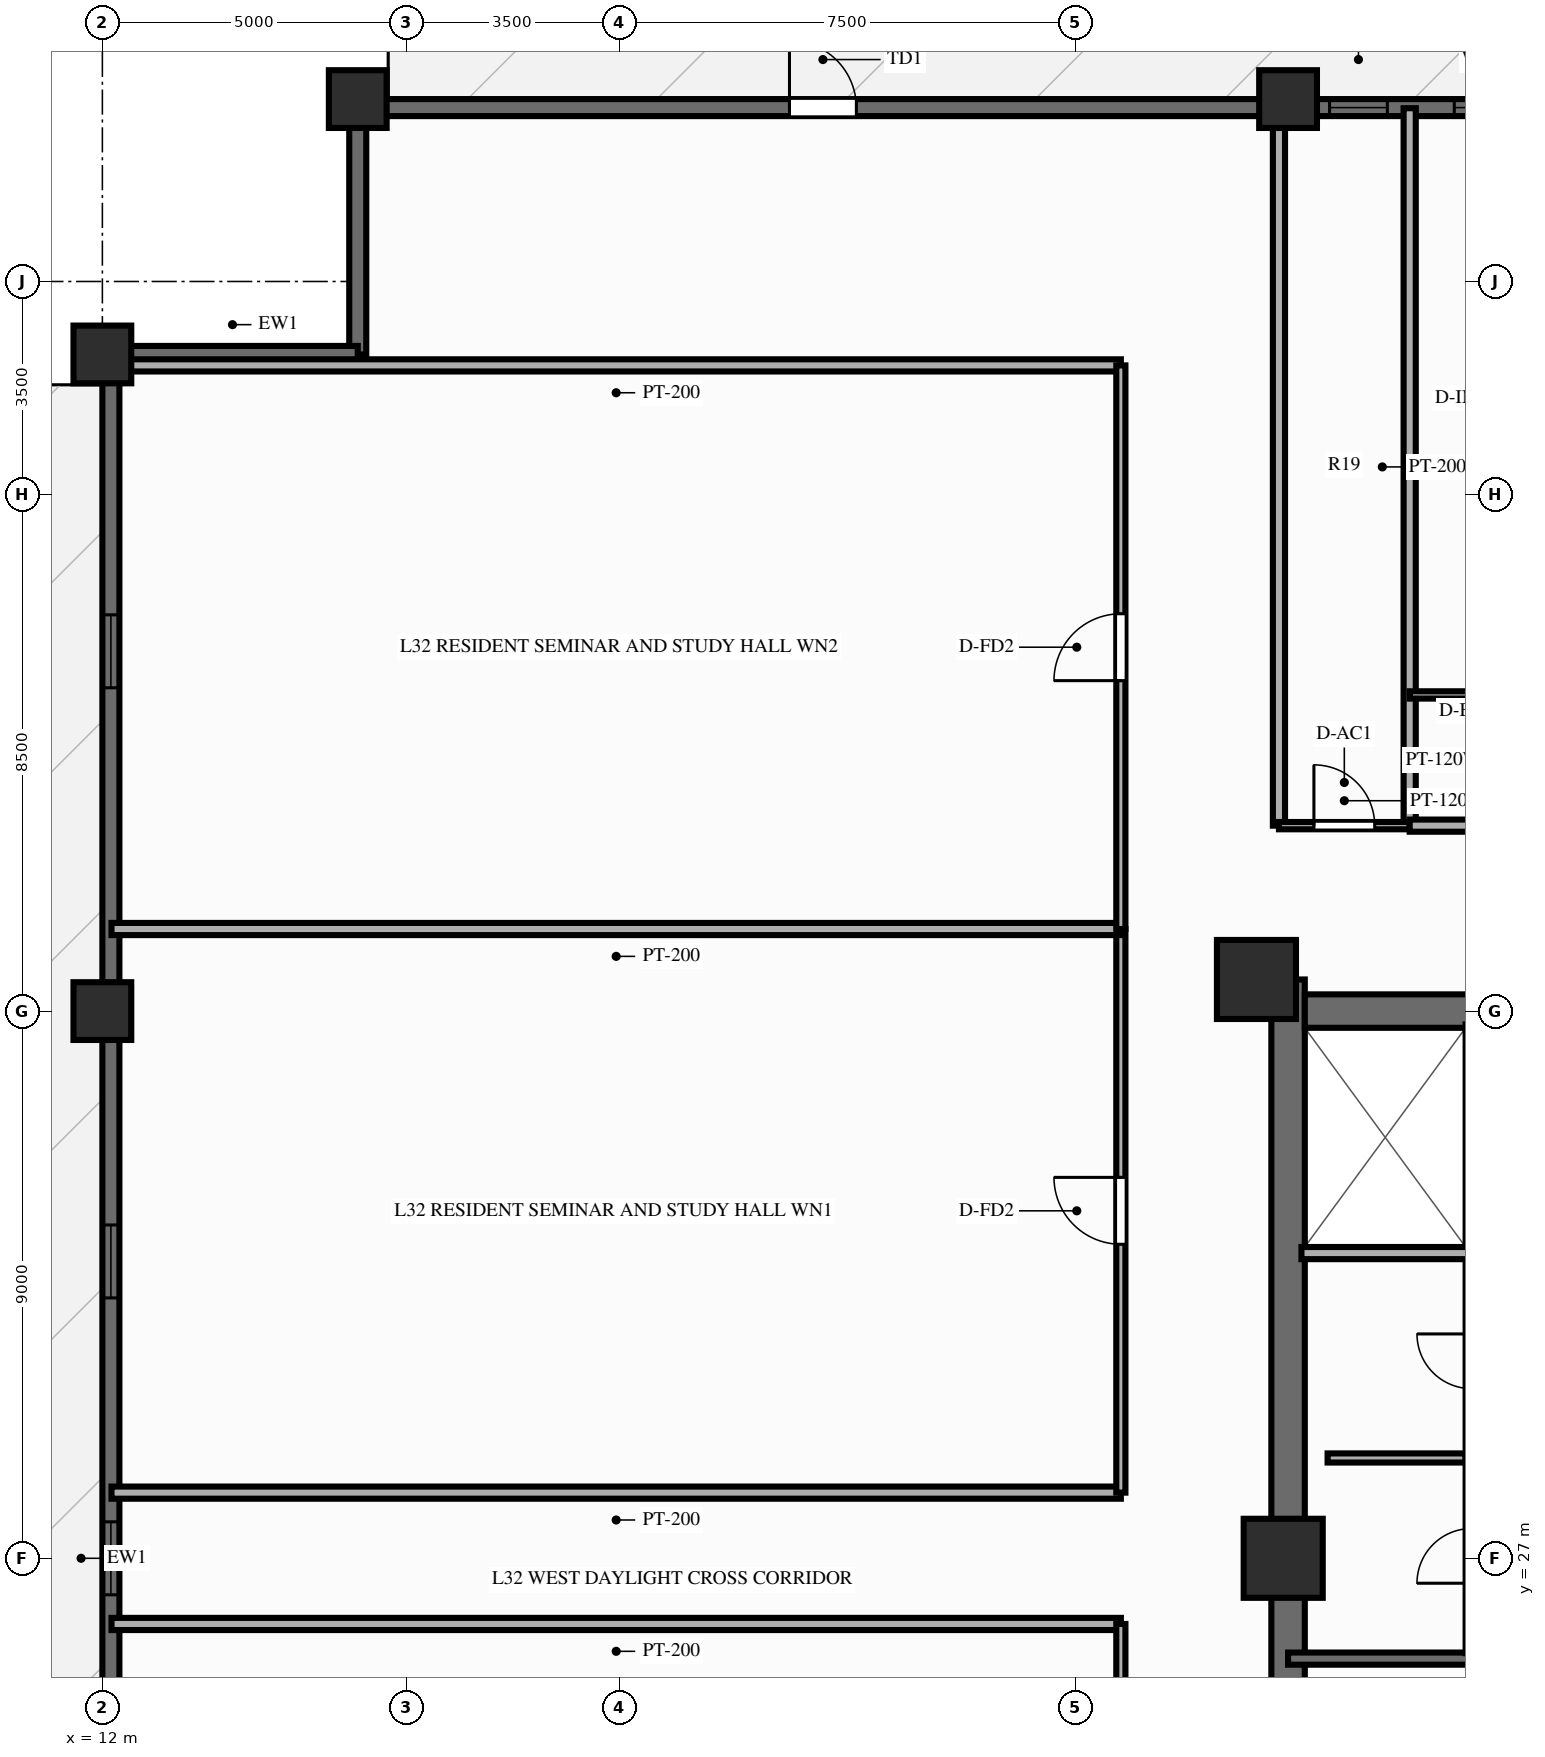
"""IFC4 building model, lengths in metres.
Left out: names, types, materials, properties, quantities, classifications, styles, units other than length and angle.
Written with IfcOpenShell. Run it as: python <this file> out.ifc"""

import sys

from ifc_helpers import new_model, si_unit, direction, frame, frame_2d, origin, origin_2d, place, context, subcontext, project, spatial, rectangle, extrude, source, transform, mapped, element, fill, save


model = new_model("IFC4")
c1 = context("Model", 3, precision=1e-05, world=origin(), true_north=direction((0.0, 1.0)))
c2 = subcontext(c1, "Body", "Model", "MODEL_VIEW")
j1 = project(units=[si_unit("LENGTHUNIT", "METRE"), si_unit("PLANEANGLEUNIT", "RADIAN")], contexts=[c1])
p1 = place(None, origin())
s1 = spatial("IfcSite", under=j1, at=p1, CompositionType="ELEMENT")
p2 = place(p1, origin())
s2 = spatial("IfcBuilding", under=s1, at=p2, CompositionType="ELEMENT")
p3 = place(p2, frame((0.0, 0.0, 101.85)))
s3 = spatial("IfcBuildingStorey", under=s2, at=p3, CompositionType="ELEMENT", Elevation=101.85)
p4 = place(p3, frame((31.5, 17.48, 0.0), z_axis=(0.0, 0.0, 1.0), x_axis=(0.0, 1.0, 0.0)))
e1 = element("IfcWall", 1, at=p4, inside=s3, PredefinedType="SHEAR", context=c2, shape_type="SweptSolid", body=[
    extrude(rectangle(XDim=19.04, YDim=0.55, at=frame_2d((9.52, 0.0))), origin(), (0.0, 0.0, 1.0), 3.0),
])
p5 = place(p4, frame((6.32, 0.0, 0.0)))
e2 = element("IfcOpeningElement", 2, at=p5, cuts=e1, PredefinedType="OPENING", context=c2, shape_type="SweptSolid", body=[
    extrude(rectangle(XDim=1.1, YDim=2.15, at=frame_2d((0.55, 1.075))), frame((0.0, 0.287, 0.0), z_axis=(0.0, -1.0, 0.0), x_axis=(1.0, 0.0, 0.0)), (0.0, 0.0, 1.0), 0.574),
])
p6 = place(p3, frame((31.775, 36.0, 0.0), z_axis=(0.0, 0.0, 1.0), x_axis=(1.0, 0.0, 0.0)))
e3 = element("IfcWall", 3, at=p6, inside=s3, PredefinedType="SHEAR", context=c2, shape_type="SweptSolid", body=[
    extrude(rectangle(XDim=12.45, YDim=0.55, at=frame_2d((6.225, 0.0))), origin(), (0.0, 0.0, 1.0), 3.0),
])
p7 = place(p6, frame((5.175, 0.0, 0.0), z_axis=(0.0, 0.0, 1.0), x_axis=(-1.0, 0.0, 0.0)))
e4 = element("IfcOpeningElement", 4, at=p7, cuts=e3, PredefinedType="OPENING", context=c2, shape_type="SweptSolid", body=[
    extrude(rectangle(XDim=1.4, YDim=2.15, at=frame_2d((0.7, 1.075))), frame((0.0, 0.287, 0.0), z_axis=(0.0, -1.0, 0.0), x_axis=(1.0, 0.0, 0.0)), (0.0, 0.0, 1.0), 0.574),
])
m1 = source(origin(), c2, "Body", "SweptSolid", [
    extrude(rectangle(XDim=1.3, YDim=1.3, at=origin_2d()), origin(), (0.0, 0.0, 1.0), 3.0),
])
for number, where, z_axis, x_axis in (
    (5, (30.98, 36.52, 0.0), (0.0, 0.0, 1.0), (1.0, 0.0, 0.0)),
    (6, (31.42, 27.0, 0.0), (0.0, 0.0, 1.0), (1.0, 0.0, 0.0)),
):
    element("IfcColumn", number, at=place(p3, frame(where, z_axis=z_axis, x_axis=x_axis)), inside=s3, PredefinedType="COLUMN", context=c2, shape_type="MappedRepresentation", body=[
        mapped(m1, transform((0.0, 0.0, 0.0), scale=1.0)),
    ])
m2 = source(origin(), c2, "Body", "SweptSolid", [
    extrude(rectangle(XDim=0.95, YDim=0.95, at=origin_2d()), origin(), (0.0, 0.0, 1.0), 3.0),
])
for number, where, z_axis, x_axis in (
    (7, (31.5, 51.0, 0.0), (0.0, 0.0, 1.0), (1.0, 0.0, 0.0)),
    (8, (16.2, 51.0, 0.0), (0.0, 0.0, 1.0), (1.0, 0.0, 0.0)),
    (9, (12.0, 46.8, 0.0), (0.0, 0.0, 1.0), (1.0, 0.0, 0.0)),
    (10, (12.0, 36.0, 0.0), (0.0, 0.0, 1.0), (1.0, 0.0, 0.0)),
):
    element("IfcColumn", number, at=place(p3, frame(where, z_axis=z_axis, x_axis=x_axis)), inside=s3, PredefinedType="COLUMN", context=c2, shape_type="MappedRepresentation", body=[
        mapped(m2, transform((0.0, 0.0, 0.0), scale=1.0)),
    ])
p8 = place(p3, frame((16.2, 50.86, 0.0), z_axis=(0.0, 0.0, 1.0), x_axis=(1.0, 0.0, 0.0)))
e11 = element("IfcWall", 11, at=p8, inside=s3, PredefinedType="SOLIDWALL", context=c2, shape_type="SweptSolid", body=[
    extrude(rectangle(XDim=43.6, YDim=0.28, at=frame_2d((21.8, 0.0))), origin(), (0.0, 0.0, 1.0), 2.28),
])
p9 = place(p8, frame((7.1, 0.0, 0.0)))
e12 = element("IfcOpeningElement", 12, at=p9, cuts=e11, PredefinedType="OPENING", context=c2, shape_type="SweptSolid", body=[
    extrude(rectangle(XDim=1.1, YDim=2.15, at=frame_2d((0.55, 1.075))), frame((0.0, 0.152, 0.0), z_axis=(0.0, -1.0, 0.0), x_axis=(1.0, 0.0, 0.0)), (0.0, 0.0, 1.0), 0.304),
])
p10 = place(p8, frame((15.982, 0.0, 0.25)))
e13 = element("IfcOpeningElement", 13, at=p10, cuts=e11, PredefinedType="OPENING", context=c2, shape_type="SweptSolid", body=[
    extrude(rectangle(XDim=0.95, YDim=1.5, at=frame_2d((0.475, 0.75))), frame((0.0, 0.152, 0.0), z_axis=(0.0, -1.0, 0.0), x_axis=(1.0, 0.0, 0.0)), (0.0, 0.0, 1.0), 0.304),
])
p11 = place(p8, frame((18.033, 0.0, 0.25)))
e14 = element("IfcOpeningElement", 14, at=p11, cuts=e11, PredefinedType="OPENING", context=c2, shape_type="SweptSolid", body=[
    extrude(rectangle(XDim=1.2, YDim=1.5, at=frame_2d((0.6, 0.75))), frame((0.0, 0.152, 0.0), z_axis=(0.0, -1.0, 0.0), x_axis=(1.0, 0.0, 0.0)), (0.0, 0.0, 1.0), 0.304),
])
p12 = place(p8, frame((20.933, 0.0, 0.25)))
e15 = element("IfcOpeningElement", 15, at=p12, cuts=e11, PredefinedType="OPENING", context=c2, shape_type="SweptSolid", body=[
    extrude(rectangle(XDim=1.2, YDim=1.5, at=frame_2d((0.6, 0.75))), frame((0.0, 0.152, 0.0), z_axis=(0.0, -1.0, 0.0), x_axis=(1.0, 0.0, 0.0)), (0.0, 0.0, 1.0), 0.304),
])
p13 = place(p8, frame((23.943, 0.0, 0.25)))
e16 = element("IfcOpeningElement", 16, at=p13, cuts=e11, PredefinedType="OPENING", context=c2, shape_type="SweptSolid", body=[
    extrude(rectangle(XDim=1.2, YDim=1.5, at=frame_2d((0.6, 0.75))), frame((0.0, 0.152, 0.0), z_axis=(0.0, -1.0, 0.0), x_axis=(1.0, 0.0, 0.0)), (0.0, 0.0, 1.0), 0.304),
])
p14 = place(p8, frame((26.386, 0.0, 0.25)))
e17 = element("IfcOpeningElement", 17, at=p14, cuts=e11, PredefinedType="OPENING", context=c2, shape_type="SweptSolid", body=[
    extrude(rectangle(XDim=1.2, YDim=1.5, at=frame_2d((0.6, 0.75))), frame((0.0, 0.152, 0.0), z_axis=(0.0, -1.0, 0.0), x_axis=(1.0, 0.0, 0.0)), (0.0, 0.0, 1.0), 0.304),
])
p15 = place(p8, frame((35.35, 0.0, 0.25)))
e18 = element("IfcOpeningElement", 18, at=p15, cuts=e11, PredefinedType="OPENING", context=c2, shape_type="SweptSolid", body=[
    extrude(rectangle(XDim=1.2, YDim=1.5, at=frame_2d((0.6, 0.75))), frame((0.0, 0.152, 0.0), z_axis=(0.0, -1.0, 0.0), x_axis=(1.0, 0.0, 0.0)), (0.0, 0.0, 1.0), 0.304),
])
p16 = place(p3, frame((12.14, 7.2, 0.0), z_axis=(0.0, 0.0, 1.0), x_axis=(0.0, 1.0, 0.0)))
e19 = element("IfcWall", 19, at=p16, inside=s3, PredefinedType="SOLIDWALL", context=c2, shape_type="SweptSolid", body=[
    extrude(rectangle(XDim=39.6, YDim=0.28, at=frame_2d((19.8, 0.0))), origin(), (0.0, 0.0, 1.0), 2.28),
])
p17 = place(p16, frame((4.083, 0.0, 0.0)))
e20 = element("IfcOpeningElement", 20, at=p17, cuts=e19, PredefinedType="OPENING", context=c2, shape_type="SweptSolid", body=[
    extrude(rectangle(XDim=1.6, YDim=2.15, at=frame_2d((0.8, 1.075))), frame((0.0, 0.152, 0.0), z_axis=(0.0, -1.0, 0.0), x_axis=(1.0, 0.0, 0.0)), (0.0, 0.0, 1.0), 0.304),
])
p18 = place(p16, frame((14.317, 0.0, 0.25)))
e21 = element("IfcOpeningElement", 21, at=p18, cuts=e19, PredefinedType="OPENING", context=c2, shape_type="SweptSolid", body=[
    extrude(rectangle(XDim=1.2, YDim=1.5, at=frame_2d((0.6, 0.75))), frame((0.0, 0.152, 0.0), z_axis=(0.0, -1.0, 0.0), x_axis=(1.0, 0.0, 0.0)), (0.0, 0.0, 1.0), 0.304),
])
p19 = place(p16, frame((19.2, 0.0, 0.25)))
e22 = element("IfcOpeningElement", 22, at=p19, cuts=e19, PredefinedType="OPENING", context=c2, shape_type="SweptSolid", body=[
    extrude(rectangle(XDim=1.2, YDim=1.5, at=frame_2d((0.6, 0.75))), frame((0.0, 0.152, 0.0), z_axis=(0.0, -1.0, 0.0), x_axis=(1.0, 0.0, 0.0)), (0.0, 0.0, 1.0), 0.304),
])
p20 = place(p16, frame((24.083, 0.0, 0.25)))
e23 = element("IfcOpeningElement", 23, at=p20, cuts=e19, PredefinedType="OPENING", context=c2, shape_type="SweptSolid", body=[
    extrude(rectangle(XDim=1.2, YDim=1.5, at=frame_2d((0.6, 0.75))), frame((0.0, 0.152, 0.0), z_axis=(0.0, -1.0, 0.0), x_axis=(1.0, 0.0, 0.0)), (0.0, 0.0, 1.0), 0.304),
])
p21 = place(p16, frame((34.117, 0.0, 0.25)))
e24 = element("IfcOpeningElement", 24, at=p21, cuts=e19, PredefinedType="OPENING", context=c2, shape_type="SweptSolid", body=[
    extrude(rectangle(XDim=1.2, YDim=1.5, at=frame_2d((0.6, 0.75))), frame((0.0, 0.152, 0.0), z_axis=(0.0, -1.0, 0.0), x_axis=(1.0, 0.0, 0.0)), (0.0, 0.0, 1.0), 0.304),
])
for number, where, z_axis, x_axis in (
    (25, (16.2, 46.8, 0.0), (0.0, 0.0, 1.0), (0.0, 1.0, 0.0)),
    (26, (12.08, 46.8, 0.0), (0.0, 0.0, 1.0), (1.0, 0.0, 0.0)),
):
    element("IfcWall", number, at=place(p3, frame(where, z_axis=z_axis, x_axis=x_axis)), inside=s3, PredefinedType="SOLIDWALL", context=c2, shape_type="SweptSolid", body=[
        extrude(rectangle(XDim=4.12, YDim=0.28, at=frame_2d((2.06, 0.0))), origin(), (0.0, 0.0, 1.0), 2.28),
    ])
p22 = place(p3, frame((32.15, 28.65, 0.0), z_axis=(0.0, 0.0, 1.0), x_axis=(1.0, 0.0, 0.0)))
e27 = element("IfcWall", 27, at=p22, inside=s3, PredefinedType="PARTITIONING", context=c2, shape_type="SweptSolid", body=[
    extrude(rectangle(XDim=2.27, YDim=0.15, at=frame_2d((1.135, 0.0))), origin(), (0.0, 0.0, 1.0), 2.14),
])
p23 = place(p3, frame((31.5, 25.35, 0.0), z_axis=(0.0, 0.0, 1.0), x_axis=(1.0, 0.0, 0.0)))
e28 = element("IfcWall", 28, at=p23, inside=s3, PredefinedType="SOLIDWALL", context=c2, shape_type="SweptSolid", body=[
    extrude(rectangle(XDim=3.93, YDim=0.2, at=frame_2d((1.965, 0.0))), origin(), (0.0, 0.0, 1.0), 2.79),
])
p24 = place(p3, frame((31.72, 32.02, 0.0), z_axis=(0.0, 0.0, 1.0), x_axis=(1.0, 0.0, 0.0)))
e29 = element("IfcWall", 29, at=p24, inside=s3, PredefinedType="PARTITIONING", context=c2, shape_type="SweptSolid", body=[
    extrude(rectangle(XDim=2.8, YDim=0.2, at=frame_2d((1.4, 0.0))), origin(), (0.0, 0.0, 1.0), 2.79),
])
p25 = place(p3, frame((31.35, 39.05, 0.0), z_axis=(0.0, 0.0, 1.0), x_axis=(0.0, 1.0, 0.0)))
e30 = element("IfcWall", 30, at=p25, inside=s3, PredefinedType="PARTITIONING", context=c2, shape_type="SweptSolid", body=[
    extrude(rectangle(XDim=11.8, YDim=0.2, at=frame_2d((5.9, 0.0))), origin(), (0.0, 0.0, 1.0), 2.34),
])
p26 = place(p3, frame((33.5, 39.05, 0.0), z_axis=(0.0, 0.0, 1.0), x_axis=(0.0, 1.0, 0.0)))
e31 = element("IfcWall", 31, at=p26, inside=s3, PredefinedType="PARTITIONING", context=c2, shape_type="SweptSolid", body=[
    extrude(rectangle(XDim=11.8, YDim=0.2, at=frame_2d((5.9, 0.0))), origin(), (0.0, 0.0, 1.0), 2.79),
])
p27 = place(p3, frame((31.35, 39.05, 0.0), z_axis=(0.0, 0.0, 1.0), x_axis=(1.0, 0.0, 0.0)))
e32 = element("IfcWall", 32, at=p27, inside=s3, PredefinedType="PARTITIONING", context=c2, shape_type="SweptSolid", body=[
    extrude(rectangle(XDim=2.15, YDim=0.12, at=frame_2d((1.075, 0.0))), origin(), (0.0, 0.0, 1.0), 2.79),
])
p28 = place(p27, frame((0.575, 0.0, 0.0)))
e33 = element("IfcOpeningElement", 33, at=p28, cuts=e32, PredefinedType="OPENING", context=c2, shape_type="SweptSolid", body=[
    extrude(rectangle(XDim=1.0, YDim=2.1, at=frame_2d((0.5, 1.05))), frame((0.0, 0.072, 0.0), z_axis=(0.0, -1.0, 0.0), x_axis=(1.0, 0.0, 0.0)), (0.0, 0.0, 1.0), 0.144),
])
p29 = place(p3, frame((33.5, 39.05, 0.0), z_axis=(0.0, 0.0, 1.0), x_axis=(1.0, 0.0, 0.0)))
e34 = element("IfcWall", 34, at=p29, inside=s3, PredefinedType="PARTITIONING", context=c2, shape_type="SweptSolid", body=[
    extrude(rectangle(XDim=2.667, YDim=0.2, at=frame_2d((1.333, 0.0))), origin(), (0.0, 0.0, 1.0), 2.79),
])
p30 = place(p3, frame((33.5, 41.2, 0.0), z_axis=(0.0, 0.0, 1.0), x_axis=(1.0, 0.0, 0.0)))
e35 = element("IfcWall", 35, at=p30, inside=s3, PredefinedType="PARTITIONING", context=c2, shape_type="SweptSolid", body=[
    extrude(rectangle(XDim=2.667, YDim=0.12, at=frame_2d((1.333, 0.0))), origin(), (0.0, 0.0, 1.0), 2.79),
])
p31 = place(p3, frame((28.75, 25.92, 0.0), z_axis=(0.0, 0.0, 1.0), x_axis=(-1.0, 0.0, 0.0)))
e36 = element("IfcWall", 36, at=p31, inside=s3, PredefinedType="PARTITIONING", context=c2, shape_type="SweptSolid", body=[
    extrude(rectangle(XDim=16.6, YDim=0.2, at=frame_2d((8.3, 0.0))), origin(), (0.0, 0.0, 1.0), 2.79),
])
p32 = place(p3, frame((28.75, 16.65, 0.0), z_axis=(0.0, 0.0, 1.0), x_axis=(0.0, 1.0, 0.0)))
e37 = element("IfcWall", 37, at=p32, inside=s3, PredefinedType="PARTITIONING", context=c2, shape_type="SweptSolid", body=[
    extrude(rectangle(XDim=9.27, YDim=0.15, at=frame_2d((4.635, 0.0))), origin(), (0.0, 0.0, 1.0), 2.79),
])
p33 = place(p32, frame((4.085, 0.0, 0.0)))
e38 = element("IfcOpeningElement", 38, at=p33, cuts=e37, PredefinedType="OPENING", context=c2, shape_type="SweptSolid", body=[
    extrude(rectangle(XDim=1.1, YDim=2.15, at=frame_2d((0.55, 1.075))), frame((0.0, 0.087, 0.0), z_axis=(0.0, -1.0, 0.0), x_axis=(1.0, 0.0, 0.0)), (0.0, 0.0, 1.0), 0.174),
])
for number, where, z_axis, x_axis in (
    (39, (28.75, 28.08, 0.0), (0.0, 0.0, 1.0), (-1.0, 0.0, 0.0)),
    (40, (28.75, 46.62, 0.0), (0.0, 0.0, 1.0), (-1.0, 0.0, 0.0)),
):
    element("IfcWall", number, at=place(p3, frame(where, z_axis=z_axis, x_axis=x_axis)), inside=s3, PredefinedType="PARTITIONING", context=c2, shape_type="SweptSolid", body=[
        extrude(rectangle(XDim=16.6, YDim=0.2, at=frame_2d((8.3, 0.0))), origin(), (0.0, 0.0, 1.0), 2.79),
    ])
p34 = place(p3, frame((28.75, 28.08, 0.0), z_axis=(0.0, 0.0, 1.0), x_axis=(0.0, 1.0, 0.0)))
e41 = element("IfcWall", 41, at=p34, inside=s3, PredefinedType="PARTITIONING", context=c2, shape_type="SweptSolid", body=[
    extrude(rectangle(XDim=9.27, YDim=0.15, at=frame_2d((4.635, 0.0))), origin(), (0.0, 0.0, 1.0), 2.79),
])
p35 = place(p34, frame((4.085, 0.0, 0.0)))
e42 = element("IfcOpeningElement", 42, at=p35, cuts=e41, PredefinedType="OPENING", context=c2, shape_type="SweptSolid", body=[
    extrude(rectangle(XDim=1.1, YDim=2.15, at=frame_2d((0.55, 1.075))), frame((0.0, 0.087, 0.0), z_axis=(0.0, -1.0, 0.0), x_axis=(1.0, 0.0, 0.0)), (0.0, 0.0, 1.0), 0.174),
])
p36 = place(p3, frame((28.75, 37.35, 0.0), z_axis=(0.0, 0.0, 1.0), x_axis=(-1.0, 0.0, 0.0)))
e43 = element("IfcWall", 43, at=p36, inside=s3, PredefinedType="PARTITIONING", context=c2, shape_type="SweptSolid", body=[
    extrude(rectangle(XDim=16.6, YDim=0.2, at=frame_2d((8.3, 0.0))), origin(), (0.0, 0.0, 1.0), 2.79),
])
p37 = place(p3, frame((28.75, 37.35, 0.0), z_axis=(0.0, 0.0, 1.0), x_axis=(0.0, 1.0, 0.0)))
e44 = element("IfcWall", 44, at=p37, inside=s3, PredefinedType="PARTITIONING", context=c2, shape_type="SweptSolid", body=[
    extrude(rectangle(XDim=9.27, YDim=0.15, at=frame_2d((4.635, 0.0))), origin(), (0.0, 0.0, 1.0), 2.79),
])
p38 = place(p37, frame((4.085, 0.0, 0.0)))
e45 = element("IfcOpeningElement", 45, at=p38, cuts=e44, PredefinedType="OPENING", context=c2, shape_type="SweptSolid", body=[
    extrude(rectangle(XDim=1.1, YDim=2.15, at=frame_2d((0.55, 1.075))), frame((0.0, 0.087, 0.0), z_axis=(0.0, -1.0, 0.0), x_axis=(1.0, 0.0, 0.0)), (0.0, 0.0, 1.0), 0.174),
])
m3 = source(origin(), c2, "Body", "SweptSolid", [
    extrude(rectangle(XDim=1.1, YDim=2.15, at=frame_2d((0.55, 1.075))), frame((0.0, 0.025, 0.0), z_axis=(0.0, -1.0, 0.0), x_axis=(1.0, 0.0, 0.0)), (0.0, 0.0, 1.0), 0.05),
])
p39 = place(p9, origin())
e46 = element("IfcDoor", 46, at=p39, inside=s3, OperationType="SINGLE_SWING_LEFT", PredefinedType="DOOR", context=c2, shape_type="MappedRepresentation", body=[
    mapped(m3, transform((0.0, 0.0, 0.0), scale=1.0)),
])
fill(e12, e46)
m4 = source(origin(), c2, "Body", "SweptSolid", [
    extrude(rectangle(XDim=0.95, YDim=1.5, at=frame_2d((0.475, 0.75))), frame((0.0, 0.03, 0.0), z_axis=(0.0, -1.0, 0.0), x_axis=(1.0, 0.0, 0.0)), (0.0, 0.0, 1.0), 0.06),
])
p40 = place(p10, origin())
e47 = element("IfcWindow", 47, at=p40, inside=s3, PartitioningType="SINGLE_PANEL", PredefinedType="WINDOW", context=c2, shape_type="MappedRepresentation", body=[
    mapped(m4, transform((0.0, 0.0, 0.0), scale=1.0)),
])
fill(e13, e47)
m5 = source(origin(), c2, "Body", "SweptSolid", [
    extrude(rectangle(XDim=1.2, YDim=1.5, at=frame_2d((0.6, 0.75))), frame((0.0, 0.03, 0.0), z_axis=(0.0, -1.0, 0.0), x_axis=(1.0, 0.0, 0.0)), (0.0, 0.0, 1.0), 0.06),
])
p41 = place(p11, origin())
e48 = element("IfcWindow", 48, at=p41, inside=s3, PartitioningType="SINGLE_PANEL", PredefinedType="WINDOW", context=c2, shape_type="MappedRepresentation", body=[
    mapped(m5, transform((0.0, 0.0, 0.0), scale=1.0)),
])
fill(e14, e48)
p42 = place(p19, origin())
e49 = element("IfcWindow", 49, at=p42, inside=s3, PartitioningType="SINGLE_PANEL", PredefinedType="WINDOW", context=c2, shape_type="MappedRepresentation", body=[
    mapped(m5, transform((0.0, 0.0, 0.0), scale=1.0)),
])
fill(e22, e49)
p43 = place(p20, origin())
e50 = element("IfcWindow", 50, at=p43, inside=s3, PartitioningType="SINGLE_PANEL", PredefinedType="WINDOW", context=c2, shape_type="MappedRepresentation", body=[
    mapped(m5, transform((0.0, 0.0, 0.0), scale=1.0)),
])
fill(e23, e50)
p44 = place(p21, origin())
e51 = element("IfcWindow", 51, at=p44, inside=s3, PartitioningType="SINGLE_PANEL", PredefinedType="WINDOW", context=c2, shape_type="MappedRepresentation", body=[
    mapped(m5, transform((0.0, 0.0, 0.0), scale=1.0)),
])
fill(e24, e51)
m6 = source(origin(), c2, "Body", "SweptSolid", [
    extrude(rectangle(XDim=1.0, YDim=2.1, at=frame_2d((0.5, 1.05))), frame((0.0, 0.025, 0.0), z_axis=(0.0, -1.0, 0.0), x_axis=(1.0, 0.0, 0.0)), (0.0, 0.0, 1.0), 0.05),
])
p45 = place(p28, origin())
e52 = element("IfcDoor", 52, at=p45, inside=s3, OperationType="SINGLE_SWING_LEFT", PredefinedType="DOOR", context=c2, shape_type="MappedRepresentation", body=[
    mapped(m6, transform((0.0, 0.0, 0.0), scale=1.0)),
])
fill(e33, e52)
p46 = place(p35, origin())
e53 = element("IfcDoor", 53, at=p46, inside=s3, OperationType="SINGLE_SWING_RIGHT", PredefinedType="DOOR", context=c2, shape_type="MappedRepresentation", body=[
    mapped(m3, transform((0.0, 0.0, 0.0), scale=1.0)),
])
fill(e42, e53)
p47 = place(p38, origin())
e54 = element("IfcDoor", 54, at=p47, inside=s3, OperationType="SINGLE_SWING_LEFT", PredefinedType="DOOR", context=c2, shape_type="MappedRepresentation", body=[
    mapped(m3, transform((0.0, 0.0, 0.0), scale=1.0)),
])
fill(e45, e54)
save(model, sys.argv[1])
